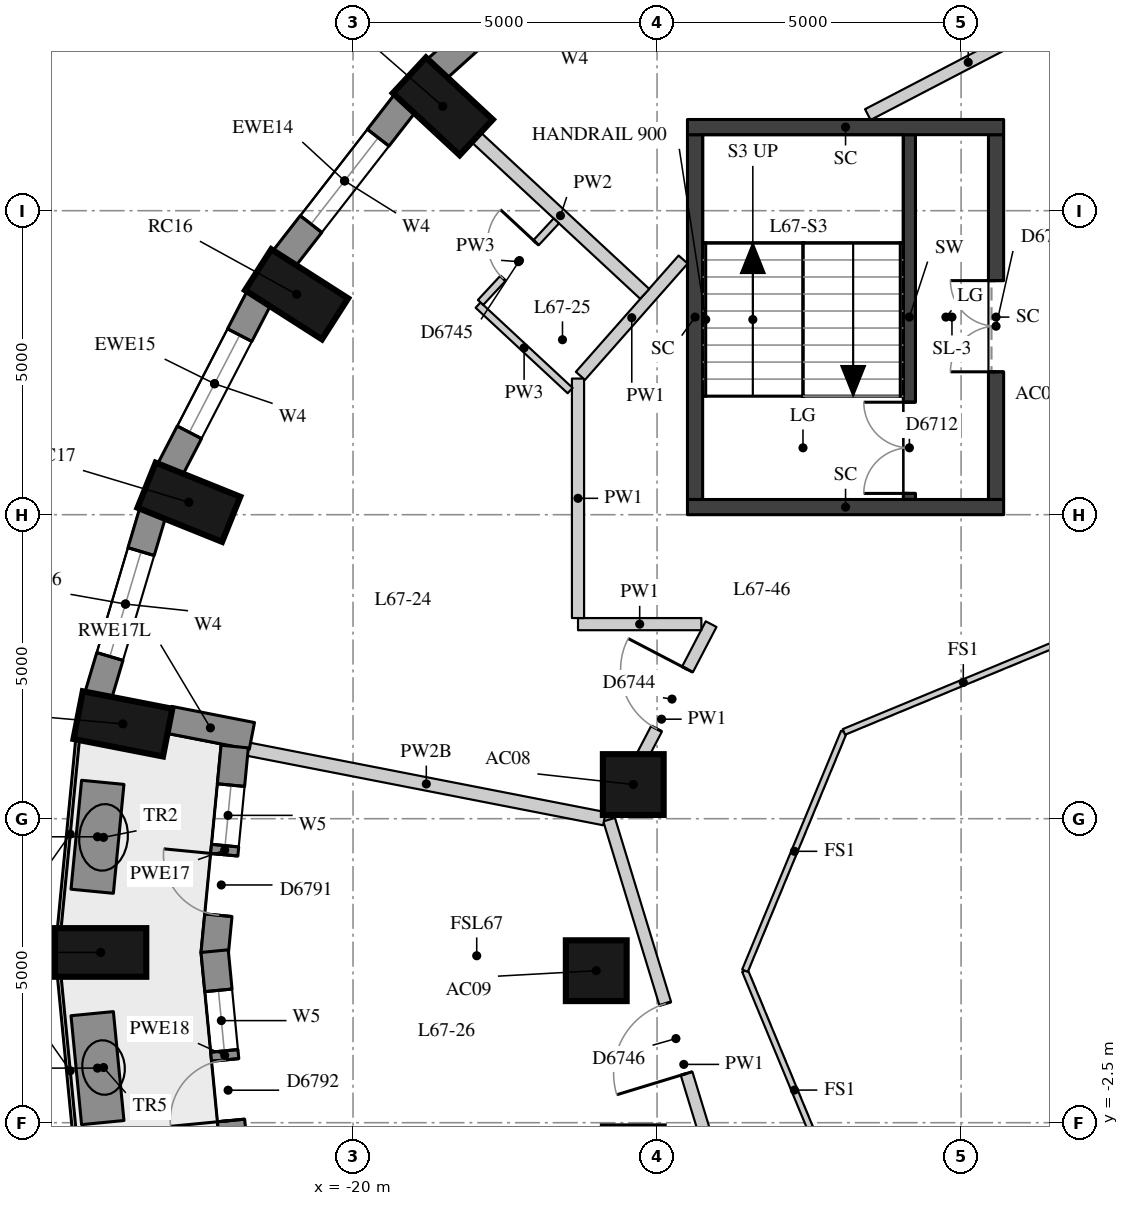
"""IFC4 building model, lengths in metres.
Left out: names, types, materials, properties, quantities, classifications, styles, units other than length and angle.
Written with IfcOpenShell. Run it as: python <this file> out.ifc"""

import sys

from ifc_helpers import new_model, si_unit, direction, frame, frame_2d, origin, origin_2d, place, context, subcontext, project, spatial, rectangle, extrude, element, fill, save


model = new_model("IFC4")
c1 = context("Model", 3, precision=1e-05, world=origin(), true_north=direction((0.0, 1.0)))
c2 = subcontext(c1, "Body", "Model", "MODEL_VIEW")
j1 = project(units=[si_unit("LENGTHUNIT", "METRE"), si_unit("PLANEANGLEUNIT", "RADIAN")], contexts=[c1])
p1 = place(None, origin())
s1 = spatial("IfcSite", under=j1, at=p1, CompositionType="ELEMENT")
p2 = place(p1, origin())
s2 = spatial("IfcBuilding", under=s1, at=p2, CompositionType="ELEMENT")
p3 = place(p2, frame((0.0, 0.0, 236.6)))
s3 = spatial("IfcBuildingStorey", under=s2, at=p3, CompositionType="ELEMENT", Elevation=236.6)
for number, where, z_axis, x_axis in (
    (1, (-18.523, 14.216, 0.0), (0.0, 0.0, 1.0), (-0.733, 0.681, 0.0)),
    (2, (-20.928, 11.125, 0.0), (0.0, 0.0, 1.0), (-0.843, 0.539, 0.0)),
    (3, (-22.7, 7.705, 0.0), (0.0, 0.0, 1.0), (-0.928, 0.374, 0.0)),
    (4, (-23.785, 4.06, 0.0), (0.0, 0.0, 1.0), (-0.981, 0.192, 0.0)),
    (5, (-24.15, 0.3, 0.0), (0.0, 0.0, 1.0), (-1.0, 0.0, 0.0)),
):
    element("IfcColumn", number, at=place(p3, frame(where, z_axis=z_axis, x_axis=x_axis)), inside=s3, PredefinedType="COLUMN", context=c2, shape_type="SweptSolid", body=[
        extrude(rectangle(XDim=1.5, YDim=0.8, at=origin_2d()), origin(), (0.0, 0.0, 1.0), 3.3),
    ])
for number, where, z_axis, x_axis in (
    (6, (-15.391, 3.062, 0.0), (0.0, 0.0, 1.0), (1.0, 0.0, 0.0)),
    (7, (-16.0, 0.0, 0.0), (0.0, 0.0, 1.0), (1.0, 0.0, 0.0)),
    (8, (-15.391, -3.062, 0.0), (0.0, 0.0, 1.0), (1.0, 0.0, 0.0)),
):
    element("IfcColumn", number, at=place(p3, frame(where, z_axis=z_axis, x_axis=x_axis)), inside=s3, PredefinedType="COLUMN", context=c2, shape_type="SweptSolid", body=[
        extrude(rectangle(XDim=1.0, YDim=1.0, at=origin_2d()), origin(), (0.0, 0.0, 1.0), 3.3),
    ])
p4 = place(p3, frame((-16.159, 17.047, 0.0), z_axis=(0.0, 0.0, 1.0), x_axis=(-0.743166014219, -0.669107073128, 0.0)))
e9 = element("IfcWall", 9, at=p4, inside=s3, PredefinedType="SOLIDWALL", context=c2, shape_type="SweptSolid", body=[
    extrude(rectangle(XDim=3.316, YDim=0.45, at=frame_2d((1.658, 0.0))), origin(), (0.0, 0.0, 1.0), 3.02),
])
p5 = place(p4, frame((0.758, 0.0, 0.4)))
e10 = element("IfcOpeningElement", 10, at=p5, cuts=e9, PredefinedType="OPENING", context=c2, shape_type="SweptSolid", body=[
    extrude(rectangle(XDim=1.8, YDim=1.75, at=frame_2d((0.9, 0.875))), frame((0.0, 0.235, 0.0), z_axis=(0.0, -1.0, 0.0), x_axis=(1.0, 0.0, 0.0)), (0.0, 0.0, 1.0), 0.47),
])
p6 = place(p3, frame((-19.142, 14.272, 0.0), z_axis=(0.0, 0.0, 1.0), x_axis=(-0.613862536705, -0.789412937587, 0.0)))
e11 = element("IfcWall", 11, at=p6, inside=s3, PredefinedType="SOLIDWALL", context=c2, shape_type="SweptSolid", body=[
    extrude(rectangle(XDim=3.247, YDim=0.45, at=frame_2d((1.624, 0.0))), origin(), (0.0, 0.0, 1.0), 3.02),
])
p7 = place(p6, frame((0.724, 0.0, 0.4)))
e12 = element("IfcOpeningElement", 12, at=p7, cuts=e11, PredefinedType="OPENING", context=c2, shape_type="SweptSolid", body=[
    extrude(rectangle(XDim=1.8, YDim=1.75, at=frame_2d((0.9, 0.875))), frame((0.0, 0.235, 0.0), z_axis=(0.0, -1.0, 0.0), x_axis=(1.0, 0.0, 0.0)), (0.0, 0.0, 1.0), 0.47),
])
p8 = place(p3, frame((-21.545, 11.068, 0.0), z_axis=(0.0, 0.0, 1.0), x_axis=(-0.459889857669, -0.887975967475, 0.0)))
e13 = element("IfcWall", 13, at=p8, inside=s3, PredefinedType="SOLIDWALL", context=c2, shape_type="SweptSolid", body=[
    extrude(rectangle(XDim=3.186, YDim=0.45, at=frame_2d((1.593, 0.0))), origin(), (0.0, 0.0, 1.0), 3.02),
])
p9 = place(p8, frame((0.693, 0.0, 0.4)))
e14 = element("IfcOpeningElement", 14, at=p9, cuts=e13, PredefinedType="OPENING", context=c2, shape_type="SweptSolid", body=[
    extrude(rectangle(XDim=1.8, YDim=1.75, at=frame_2d((0.9, 0.875))), frame((0.0, 0.235, 0.0), z_axis=(0.0, -1.0, 0.0), x_axis=(1.0, 0.0, 0.0)), (0.0, 0.0, 1.0), 0.47),
])
p10 = place(p3, frame((-23.294, 7.535, 0.0), z_axis=(0.0, 0.0, 1.0), x_axis=(-0.285263800865, -0.958449040855, 0.0)))
e15 = element("IfcWall", 15, at=p10, inside=s3, PredefinedType="SOLIDWALL", context=c2, shape_type="SweptSolid", body=[
    extrude(rectangle(XDim=3.139, YDim=0.45, at=frame_2d((1.57, 0.0))), origin(), (0.0, 0.0, 1.0), 3.02),
])
p11 = place(p10, frame((0.67, 0.0, 0.4)))
e16 = element("IfcOpeningElement", 16, at=p11, cuts=e15, PredefinedType="OPENING", context=c2, shape_type="SweptSolid", body=[
    extrude(rectangle(XDim=1.8, YDim=1.75, at=frame_2d((0.9, 0.875))), frame((0.0, 0.235, 0.0), z_axis=(0.0, -1.0, 0.0), x_axis=(1.0, 0.0, 0.0)), (0.0, 0.0, 1.0), 0.47),
])
p12 = place(p3, frame((-23.028, 4.127, 0.0), z_axis=(0.0, 0.0, 1.0), x_axis=(0.981468844755, -0.191621780535, 0.0)))
e17 = element("IfcWall", 17, at=p12, inside=s3, PredefinedType="SOLIDWALL", context=c2, shape_type="SweptSolid", body=[
    extrude(rectangle(XDim=1.39, YDim=0.45, at=frame_2d((0.695, 0.0))), origin(), (0.0, 0.0, 1.0), 2.57),
])
p13 = place(p3, frame((-21.946, 3.687, 0.0), z_axis=(0.0, 0.0, 1.0), x_axis=(-0.096467747711, -0.995336110895, 0.0)))
e18 = element("IfcWall", 18, at=p13, inside=s3, PredefinedType="SOLIDWALL", context=c2, shape_type="SweptSolid", body=[
    extrude(rectangle(XDim=3.424, YDim=0.45, at=frame_2d((1.712, 0.0))), origin(), (0.0, 0.0, 1.0), 3.02),
])
p14 = place(p13, frame((0.637, 0.0, 0.4)))
e19 = element("IfcOpeningElement", 19, at=p14, cuts=e18, PredefinedType="OPENING", context=c2, shape_type="SweptSolid", body=[
    extrude(rectangle(XDim=1.0, YDim=1.75, at=frame_2d((0.5, 0.875))), frame((0.0, 0.235, 0.0), z_axis=(0.0, -1.0, 0.0), x_axis=(1.0, 0.0, 0.0)), (0.0, 0.0, 1.0), 0.47),
])
p15 = place(p13, frame((1.787, 0.0, 0.0)))
e20 = element("IfcOpeningElement", 20, at=p15, cuts=e18, PredefinedType="OPENING", context=c2, shape_type="SweptSolid", body=[
    extrude(rectangle(XDim=1.0, YDim=2.15, at=frame_2d((0.5, 1.075))), frame((0.0, 0.235, 0.0), z_axis=(0.0, -1.0, 0.0), x_axis=(1.0, 0.0, 0.0)), (0.0, 0.0, 1.0), 0.47),
])
p16 = place(p3, frame((-22.276, 0.322, 0.0), z_axis=(0.0, 0.0, 1.0), x_axis=(0.096423819494, -0.995340367429, 0.0)))
e21 = element("IfcWall", 21, at=p16, inside=s3, PredefinedType="SOLIDWALL", context=c2, shape_type="SweptSolid", body=[
    extrude(rectangle(XDim=3.446, YDim=0.45, at=frame_2d((1.723, 0.0))), origin(), (0.0, 0.0, 1.0), 3.02),
])
p17 = place(p16, frame((0.648, 0.0, 0.4)))
e22 = element("IfcOpeningElement", 22, at=p17, cuts=e21, PredefinedType="OPENING", context=c2, shape_type="SweptSolid", body=[
    extrude(rectangle(XDim=1.0, YDim=1.75, at=frame_2d((0.5, 0.875))), frame((0.0, 0.235, 0.0), z_axis=(0.0, -1.0, 0.0), x_axis=(1.0, 0.0, 0.0)), (0.0, 0.0, 1.0), 0.47),
])
p18 = place(p16, frame((1.798, 0.0, 0.0)))
e23 = element("IfcOpeningElement", 23, at=p18, cuts=e21, PredefinedType="OPENING", context=c2, shape_type="SweptSolid", body=[
    extrude(rectangle(XDim=1.0, YDim=2.15, at=frame_2d((0.5, 1.075))), frame((0.0, 0.235, 0.0), z_axis=(0.0, -1.0, 0.0), x_axis=(1.0, 0.0, 0.0)), (0.0, 0.0, 1.0), 0.47),
])
for number, where, z_axis, x_axis in (
    (24, (-24.116, 3.098, 0.0), (0.0, 0.0, 1.0), (-0.097, -0.995, 0.0)),
    (25, (-24.29, -0.707, 0.0), (0.0, 0.0, 1.0), (0.097, -0.995, 0.0)),
):
    element("IfcWall", number, at=place(p3, frame(where, z_axis=z_axis, x_axis=x_axis)), inside=s3, PredefinedType="USERDEFINED", context=c2, shape_type="SweptSolid", body=[
        extrude(rectangle(XDim=1.8, YDim=0.7, at=frame_2d((0.9, 0.0))), origin(), (0.0, 0.0, 1.0), 0.75),
    ])
p19 = place(p3, frame((-10.85, 7.75, 0.0), z_axis=(0.0, 0.0, 1.0), x_axis=(0.0, 1.0, 0.0)))
e26 = element("IfcWall", 26, at=p19, inside=s3, PredefinedType="SHEAR", context=c2, shape_type="SweptSolid", body=[
    extrude(rectangle(XDim=6.0, YDim=0.2, at=frame_2d((3.0, 0.0))), origin(), (0.0, 0.0, 1.0), 3.02),
])
p20 = place(p19, frame((0.1, 0.0, 0.0)))
e27 = element("IfcOpeningElement", 27, at=p20, cuts=e26, PredefinedType="OPENING", context=c2, shape_type="SweptSolid", body=[
    extrude(rectangle(XDim=1.5, YDim=2.1, at=frame_2d((0.75, 1.05))), frame((0.0, 0.11, 0.0), z_axis=(0.0, -1.0, 0.0), x_axis=(1.0, 0.0, 0.0)), (0.0, 0.0, 1.0), 0.22),
])
p21 = place(p3, frame((-14.375, 7.75, -0.28), z_axis=(0.0, 0.0, 1.0), x_axis=(0.0, 1.0, 0.0)))
e28 = element("IfcWall", 28, at=p21, inside=s3, PredefinedType="SHEAR", context=c2, shape_type="SweptSolid", body=[
    extrude(rectangle(XDim=6.0, YDim=0.25, at=frame_2d((3.0, 0.0))), origin(), (0.0, 0.0, 1.0), 3.3),
])
p22 = place(p3, frame((-9.425, 7.75, -0.28), z_axis=(0.0, 0.0, 1.0), x_axis=(0.0, 1.0, 0.0)))
e29 = element("IfcWall", 29, at=p22, inside=s3, PredefinedType="SHEAR", context=c2, shape_type="SweptSolid", body=[
    extrude(rectangle(XDim=6.0, YDim=0.25, at=frame_2d((3.0, 0.0))), origin(), (0.0, 0.0, 1.0), 3.3),
])
p23 = place(p22, frame((2.1, 0.0, 0.28)))
e30 = element("IfcOpeningElement", 30, at=p23, cuts=e29, PredefinedType="OPENING", context=c2, shape_type="SweptSolid", body=[
    extrude(rectangle(XDim=1.5, YDim=2.1, at=frame_2d((0.75, 1.05))), frame((0.0, 0.135, 0.0), z_axis=(0.0, -1.0, 0.0), x_axis=(1.0, 0.0, 0.0)), (0.0, 0.0, 1.0), 0.27),
])
for number, where, z_axis, x_axis in (
    (31, (-14.5, 13.875, -0.28), (0.0, 0.0, 1.0), (1.0, 0.0, 0.0)),
    (32, (-14.5, 7.625, -0.28), (0.0, 0.0, 1.0), (1.0, 0.0, 0.0)),
):
    element("IfcWall", number, at=place(p3, frame(where, z_axis=z_axis, x_axis=x_axis)), inside=s3, PredefinedType="SHEAR", context=c2, shape_type="SweptSolid", body=[
        extrude(rectangle(XDim=5.2, YDim=0.25, at=frame_2d((2.6, 0.0))), origin(), (0.0, 0.0, 1.0), 3.3),
    ])
p24 = place(p3, frame((-11.534, 14.081, 0.0), z_axis=(0.0, 0.0, 1.0), x_axis=(0.886975089277, 0.461817270143, 0.0)))
e33 = element("IfcWall", 33, at=p24, inside=s3, PredefinedType="PARTITIONING", context=c2, shape_type="SweptSolid", body=[
    extrude(rectangle(XDim=3.723, YDim=0.2, at=frame_2d((1.861, 0.0))), origin(), (0.0, 0.0, 1.0), 3.02),
])
p25 = place(p3, frame((-13.333, -5.567, 0.0), z_axis=(0.0, 0.0, 1.0), x_axis=(-0.291732883234, 0.956499830026, 0.0)))
e34 = element("IfcWall", 34, at=p25, inside=s3, PredefinedType="PARTITIONING", context=c2, shape_type="SweptSolid", body=[
    extrude(rectangle(XDim=8.417, YDim=0.2, at=frame_2d((4.208, 0.0))), origin(), (0.0, 0.0, 1.0), 3.02),
])
p26 = place(p25, frame((4.053, 0.0, 0.0)))
e35 = element("IfcOpeningElement", 35, at=p26, cuts=e34, PredefinedType="OPENING", context=c2, shape_type="SweptSolid", body=[
    extrude(rectangle(XDim=1.2, YDim=2.1, at=frame_2d((0.6, 1.05))), frame((0.0, 0.11, 0.0), z_axis=(0.0, -1.0, 0.0), x_axis=(1.0, 0.0, 0.0)), (0.0, 0.0, 1.0), 0.22),
])
p27 = place(p3, frame((-15.742, 2.573, 0.0), z_axis=(0.0, 0.0, 1.0), x_axis=(0.462435860297, 0.886652736482, 0.0)))
e36 = element("IfcWall", 36, at=p27, inside=s3, PredefinedType="PARTITIONING", context=c2, shape_type="SweptSolid", body=[
    extrude(rectangle(XDim=3.526, YDim=0.2, at=frame_2d((1.763, 0.0))), origin(), (0.0, 0.0, 1.0), 3.02),
])
p28 = place(p27, frame((1.586, 0.0, 0.0)))
e37 = element("IfcOpeningElement", 37, at=p28, cuts=e36, PredefinedType="OPENING", context=c2, shape_type="SweptSolid", body=[
    extrude(rectangle(XDim=1.1, YDim=2.1, at=frame_2d((0.55, 1.05))), frame((0.0, 0.11, 0.0), z_axis=(0.0, -1.0, 0.0), x_axis=(1.0, 0.0, 0.0)), (0.0, 0.0, 1.0), 0.22),
])
p29 = place(p3, frame((-14.271, 5.7, 0.0), z_axis=(0.0, 0.0, 1.0), x_axis=(-1.0, 0.0, 0.0)))
e38 = element("IfcWall", 38, at=p29, inside=s3, PredefinedType="PARTITIONING", context=c2, shape_type="SweptSolid", body=[
    extrude(rectangle(XDim=2.029, YDim=0.2, at=frame_2d((1.014, 0.0))), origin(), (0.0, 0.0, 1.0), 3.02),
])
p30 = place(p3, frame((-16.3, 5.8, 0.0), z_axis=(0.0, 0.0, 1.0), x_axis=(0.0, 1.0, 0.0)))
e39 = element("IfcWall", 39, at=p30, inside=s3, PredefinedType="PARTITIONING", context=c2, shape_type="SweptSolid", body=[
    extrude(rectangle(XDim=3.939, YDim=0.2, at=frame_2d((1.969, 0.0))), origin(), (0.0, 0.0, 1.0), 3.02),
])
p31 = place(p3, frame((-16.26, 9.783, 0.0), z_axis=(0.0, 0.0, 1.0), x_axis=(0.66199168739, 0.74951117792, 0.0)))
e40 = element("IfcWall", 40, at=p31, inside=s3, PredefinedType="PARTITIONING", context=c2, shape_type="SweptSolid", body=[
    extrude(rectangle(XDim=2.552, YDim=0.2, at=frame_2d((1.276, 0.0))), origin(), (0.0, 0.0, 1.0), 3.02),
])
p32 = place(p3, frame((-17.974, 13.706, 0.0), z_axis=(0.0, 0.0, 1.0), x_axis=(0.732644022802, -0.680612030346, 0.0)))
e41 = element("IfcWall", 41, at=p32, inside=s3, PredefinedType="PARTITIONING", context=c2, shape_type="SweptSolid", body=[
    extrude(rectangle(XDim=3.782, YDim=0.22, at=frame_2d((1.891, 0.0))), origin(), (0.0, 0.0, 1.0), 3.02),
])
p33 = place(p3, frame((-21.724, 3.643, 0.0), z_axis=(0.0, 0.0, 1.0), x_axis=(0.981479525595, -0.191567066159, 0.0)))
e42 = element("IfcWall", 42, at=p33, inside=s3, PredefinedType="PARTITIONING", context=c2, shape_type="SweptSolid", body=[
    extrude(rectangle(XDim=5.968, YDim=0.22, at=frame_2d((2.984, 0.0))), origin(), (0.0, 0.0, 1.0), 2.57),
])
p34 = place(p3, frame((-16.429, 9.541, 0.0), z_axis=(0.0, 0.0, 1.0), x_axis=(-0.732625124054, 0.680632373315, 0.0)))
e43 = element("IfcWall", 43, at=p34, inside=s3, PredefinedType="PARTITIONING", context=c2, shape_type="SweptSolid", body=[
    extrude(rectangle(XDim=2.066, YDim=0.12, at=frame_2d((1.033, 0.0))), origin(), (0.0, 0.0, 1.0), 3.02),
])
p35 = place(p3, frame((-17.902, 10.991, 0.0), z_axis=(0.0, 0.0, 1.0), x_axis=(0.680681343043, 0.732579626548, 0.0)))
e44 = element("IfcWall", 44, at=p35, inside=s3, PredefinedType="PARTITIONING", context=c2, shape_type="SweptSolid", body=[
    extrude(rectangle(XDim=1.83, YDim=0.12, at=frame_2d((0.915, 0.0))), origin(), (0.0, 0.0, 1.0), 3.02),
])
p36 = place(p35, frame((0.54, 0.0, 0.0)))
e45 = element("IfcOpeningElement", 45, at=p36, cuts=e44, PredefinedType="OPENING", context=c2, shape_type="SweptSolid", body=[
    extrude(rectangle(XDim=0.8, YDim=2.1, at=frame_2d((0.4, 1.05))), frame((0.0, 0.07, 0.0), z_axis=(0.0, -1.0, 0.0), x_axis=(1.0, 0.0, 0.0)), (0.0, 0.0, 1.0), 0.14),
])
for number, where, z_axis, x_axis in (
    (46, (-11.927, -3.927, 0.0), (0.0, 0.0, 1.0), (-0.383, 0.924, 0.0)),
    (47, (-13.554, 0.0, 0.0), (0.0, 0.0, 1.0), (0.383, 0.924, 0.0)),
    (48, (-11.927, 3.927, 0.0), (0.0, 0.0, 1.0), (0.924, 0.383, 0.0)),
):
    element("IfcWall", number, at=place(p3, frame(where, z_axis=z_axis, x_axis=x_axis)), inside=s3, PredefinedType="PARTITIONING", context=c2, shape_type="SweptSolid", body=[
        extrude(rectangle(XDim=4.251, YDim=0.1, at=frame_2d((2.125, 0.0))), origin(), (0.0, 0.0, 1.0), 3.02),
    ])
p37 = place(p7, origin())
e49 = element("IfcWindow", 49, at=p37, inside=s3, PartitioningType="SINGLE_PANEL", PredefinedType="WINDOW", context=c2, shape_type="SweptSolid", body=[
    extrude(rectangle(XDim=1.8, YDim=1.75, at=frame_2d((0.9, 0.875))), frame((0.0, 0.035, 0.0), z_axis=(0.0, -1.0, 0.0), x_axis=(1.0, 0.0, 0.0)), (0.0, 0.0, 1.0), 0.06),
])
fill(e12, e49)
p38 = place(p9, origin())
e50 = element("IfcWindow", 50, at=p38, inside=s3, PartitioningType="SINGLE_PANEL", PredefinedType="WINDOW", context=c2, shape_type="SweptSolid", body=[
    extrude(rectangle(XDim=1.8, YDim=1.75, at=frame_2d((0.9, 0.875))), frame((0.0, 0.035, 0.0), z_axis=(0.0, -1.0, 0.0), x_axis=(1.0, 0.0, 0.0)), (0.0, 0.0, 1.0), 0.06),
])
fill(e14, e50)
p39 = place(p11, origin())
e51 = element("IfcWindow", 51, at=p39, inside=s3, PartitioningType="SINGLE_PANEL", PredefinedType="WINDOW", context=c2, shape_type="SweptSolid", body=[
    extrude(rectangle(XDim=1.8, YDim=1.75, at=frame_2d((0.9, 0.875))), frame((0.0, 0.035, 0.0), z_axis=(0.0, -1.0, 0.0), x_axis=(1.0, 0.0, 0.0)), (0.0, 0.0, 1.0), 0.06),
])
fill(e16, e51)
p40 = place(p14, origin())
e52 = element("IfcWindow", 52, at=p40, inside=s3, PartitioningType="SINGLE_PANEL", PredefinedType="WINDOW", context=c2, shape_type="SweptSolid", body=[
    extrude(rectangle(XDim=1.0, YDim=1.75, at=frame_2d((0.5, 0.875))), frame((0.0, 0.035, 0.0), z_axis=(0.0, -1.0, 0.0), x_axis=(1.0, 0.0, 0.0)), (0.0, 0.0, 1.0), 0.06),
])
fill(e19, e52)
p41 = place(p15, frame((1.0, 0.0, 0.0), z_axis=(0.0, 0.0, 1.0), x_axis=(-1.0, 0.0, 0.0)))
e53 = element("IfcDoor", 53, at=p41, inside=s3, OperationType="SINGLE_SWING_RIGHT", PredefinedType="DOOR", context=c2, shape_type="SweptSolid", body=[
    extrude(rectangle(XDim=1.0, YDim=2.15, at=frame_2d((0.5, 1.075))), frame((0.0, 0.075, 0.0), z_axis=(0.0, -1.0, 0.0), x_axis=(1.0, 0.0, 0.0)), (0.0, 0.0, 1.0), 0.05),
])
fill(e20, e53)
p42 = place(p17, origin())
e54 = element("IfcWindow", 54, at=p42, inside=s3, PartitioningType="SINGLE_PANEL", PredefinedType="WINDOW", context=c2, shape_type="SweptSolid", body=[
    extrude(rectangle(XDim=1.0, YDim=1.75, at=frame_2d((0.5, 0.875))), frame((0.0, 0.035, 0.0), z_axis=(0.0, -1.0, 0.0), x_axis=(1.0, 0.0, 0.0)), (0.0, 0.0, 1.0), 0.06),
])
fill(e22, e54)
p43 = place(p18, frame((1.0, 0.0, 0.0), z_axis=(0.0, 0.0, 1.0), x_axis=(-1.0, 0.0, 0.0)))
e55 = element("IfcDoor", 55, at=p43, inside=s3, OperationType="SINGLE_SWING_LEFT", PredefinedType="DOOR", context=c2, shape_type="SweptSolid", body=[
    extrude(rectangle(XDim=1.0, YDim=2.15, at=frame_2d((0.5, 1.075))), frame((0.0, 0.075, 0.0), z_axis=(0.0, -1.0, 0.0), x_axis=(1.0, 0.0, 0.0)), (0.0, 0.0, 1.0), 0.05),
])
fill(e23, e55)
p44 = place(p20, origin())
e56 = element("IfcDoor", 56, at=p44, inside=s3, OperationType="DOUBLE_DOOR_SINGLE_SWING", PredefinedType="DOOR", context=c2, shape_type="SweptSolid", body=[
    extrude(rectangle(XDim=1.5, YDim=2.1, at=frame_2d((0.75, 1.05))), frame((0.0, 0.025, 0.0), z_axis=(0.0, -1.0, 0.0), x_axis=(1.0, 0.0, 0.0)), (0.0, 0.0, 1.0), 0.05),
])
fill(e27, e56)
p45 = place(p23, origin())
e57 = element("IfcDoor", 57, at=p45, inside=s3, OperationType="DOUBLE_DOOR_SINGLE_SWING", PredefinedType="DOOR", context=c2, shape_type="SweptSolid", body=[
    extrude(rectangle(XDim=1.5, YDim=2.1, at=frame_2d((0.75, 1.05))), frame((0.0, 0.025, 0.0), z_axis=(0.0, -1.0, 0.0), x_axis=(1.0, 0.0, 0.0)), (0.0, 0.0, 1.0), 0.05),
])
fill(e30, e57)
p46 = place(p28, origin())
e58 = element("IfcDoor", 58, at=p46, inside=s3, OperationType="SINGLE_SWING_RIGHT", PredefinedType="DOOR", context=c2, shape_type="SweptSolid", body=[
    extrude(rectangle(XDim=1.1, YDim=2.1, at=frame_2d((0.55, 1.05))), frame((0.0, 0.025, 0.0), z_axis=(0.0, -1.0, 0.0), x_axis=(1.0, 0.0, 0.0)), (0.0, 0.0, 1.0), 0.05),
])
fill(e37, e58)
p47 = place(p36, origin())
e59 = element("IfcDoor", 59, at=p47, inside=s3, OperationType="SINGLE_SWING_RIGHT", PredefinedType="DOOR", context=c2, shape_type="SweptSolid", body=[
    extrude(rectangle(XDim=0.8, YDim=2.1, at=frame_2d((0.4, 1.05))), frame((0.0, 0.025, 0.0), z_axis=(0.0, -1.0, 0.0), x_axis=(1.0, 0.0, 0.0)), (0.0, 0.0, 1.0), 0.05),
])
fill(e45, e59)
p48 = place(p26, origin())
e60 = element("IfcDoor", 60, at=p48, inside=s3, OperationType="SINGLE_SWING_LEFT", PredefinedType="DOOR", context=c2, shape_type="SweptSolid", body=[
    extrude(rectangle(XDim=1.2, YDim=2.1, at=frame_2d((0.6, 1.05))), frame((0.0, 0.025, 0.0), z_axis=(0.0, -1.0, 0.0), x_axis=(1.0, 0.0, 0.0)), (0.0, 0.0, 1.0), 0.05),
])
fill(e35, e60)
save(model, sys.argv[1])
